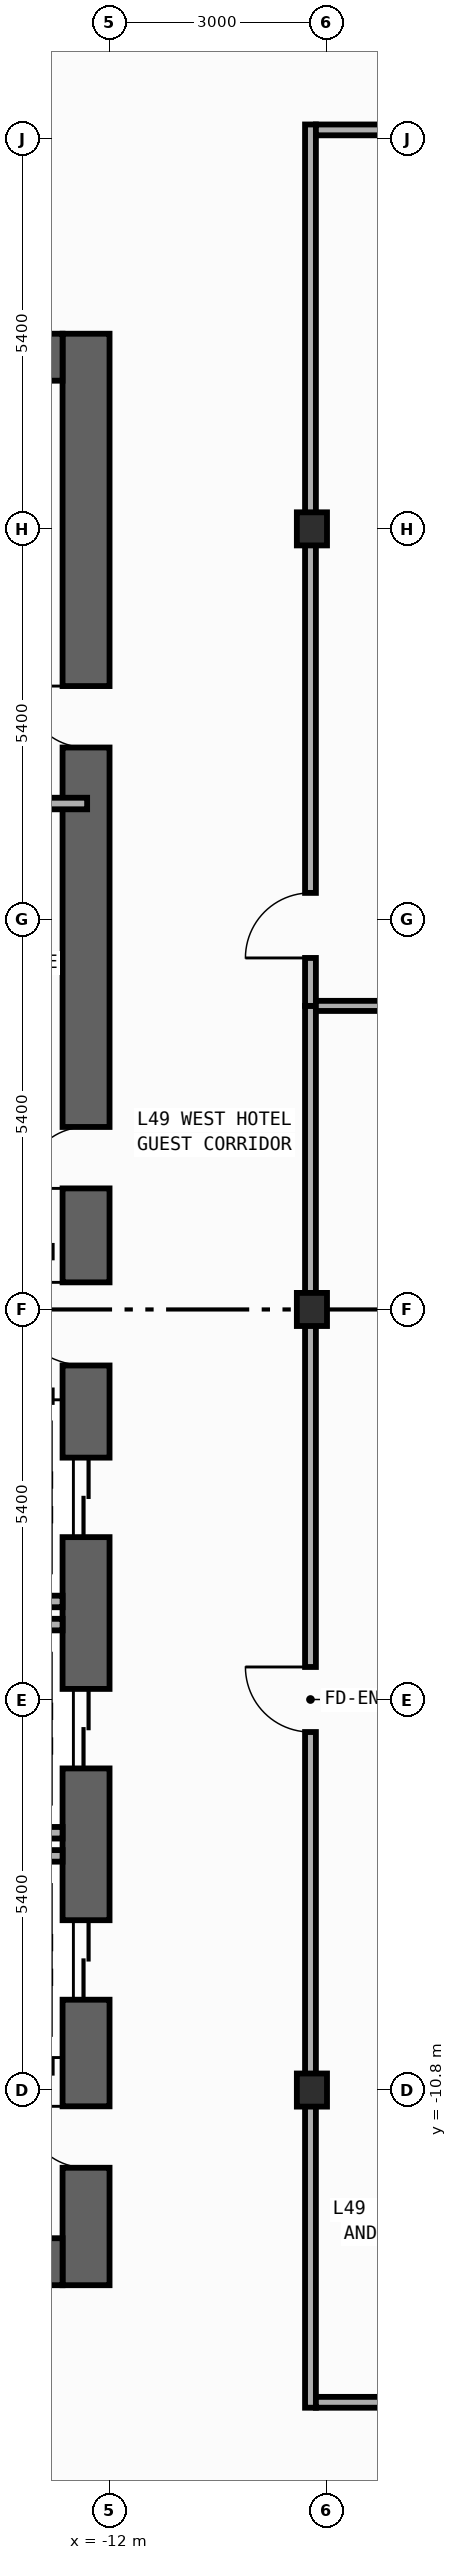
"""IFC4 building model, lengths in metres.
Left out: names, types, materials, properties, quantities, classifications, styles, units other than length and angle.
Written with IfcOpenShell. Run it as: python <this file> out.ifc"""

import sys

from ifc_helpers import new_model, si_unit, direction, frame, frame_2d, origin, origin_2d, place, context, subcontext, project, spatial, rectangle, i_section, extrude, element, fill, save


model = new_model("IFC4")
c1 = context("Model", 3, precision=1e-05, world=origin(), true_north=direction((0.0, 1.0)))
c2 = subcontext(c1, "Body", "Model", "MODEL_VIEW")
j1 = project(units=[si_unit("LENGTHUNIT", "METRE"), si_unit("PLANEANGLEUNIT", "RADIAN")], contexts=[c1])
p1 = place(None, origin())
s1 = spatial("IfcSite", under=j1, at=p1, CompositionType="ELEMENT")
p2 = place(p1, origin())
s2 = spatial("IfcBuilding", under=s1, at=p2, CompositionType="ELEMENT")
p3 = place(p2, frame((0.0, 0.0, 210.6)))
s3 = spatial("IfcBuildingStorey", under=s2, at=p3, CompositionType="ELEMENT", Elevation=210.6)
p4 = place(p3, frame((-12.325, -13.5, 0.0), z_axis=(0.0, 0.0, 1.0), x_axis=(0.0, 1.0, 0.0)))
e1 = element("IfcWall", 1, at=p4, inside=s3, PredefinedType="SHEAR", context=c2, shape_type="SweptSolid", body=[
    extrude(rectangle(XDim=27.0, YDim=0.65, at=frame_2d((13.5, 0.0))), origin(), (0.0, 0.0, 1.0), 3.45),
])
p5 = place(p4, frame((10.35, 0.0, 0.0)))
e2 = element("IfcOpeningElement", 2, at=p5, cuts=e1, PredefinedType="OPENING", context=c2, shape_type="SweptSolid", body=[
    extrude(rectangle(XDim=1.1, YDim=2.2, at=frame_2d((0.55, 1.1))), frame((0.0, 0.335, 0.0), z_axis=(0.0, -1.0, 0.0), x_axis=(1.0, 0.0, 0.0)), (0.0, 0.0, 1.0), 0.67),
])
p6 = place(p4, frame((7.15, 0.0, 0.0)))
e3 = element("IfcOpeningElement", 3, at=p6, cuts=e1, PredefinedType="OPENING", context=c2, shape_type="SweptSolid", body=[
    extrude(rectangle(XDim=1.1, YDim=2.2, at=frame_2d((0.55, 1.1))), frame((0.0, 0.335, 0.0), z_axis=(0.0, -1.0, 0.0), x_axis=(1.0, 0.0, 0.0)), (0.0, 0.0, 1.0), 0.67),
])
p7 = place(p4, frame((3.95, 0.0, 0.0)))
e4 = element("IfcOpeningElement", 4, at=p7, cuts=e1, PredefinedType="OPENING", context=c2, shape_type="SweptSolid", body=[
    extrude(rectangle(XDim=1.1, YDim=2.2, at=frame_2d((0.55, 1.1))), frame((0.0, 0.335, 0.0), z_axis=(0.0, -1.0, 0.0), x_axis=(1.0, 0.0, 0.0)), (0.0, 0.0, 1.0), 0.67),
])
p8 = place(p4, frame((15.175, 0.0, 0.0)))
e5 = element("IfcOpeningElement", 5, at=p8, cuts=e1, PredefinedType="OPENING", context=c2, shape_type="SweptSolid", body=[
    extrude(rectangle(XDim=0.85, YDim=2.1, at=frame_2d((0.425, 1.05))), frame((0.0, 0.335, 0.0), z_axis=(0.0, -1.0, 0.0), x_axis=(1.0, 0.0, 0.0)), (0.0, 0.0, 1.0), 0.67),
])
p9 = place(p4, frame((21.275, 0.0, 0.0)))
e6 = element("IfcOpeningElement", 6, at=p9, cuts=e1, PredefinedType="OPENING", context=c2, shape_type="SweptSolid", body=[
    extrude(rectangle(XDim=0.85, YDim=2.1, at=frame_2d((0.425, 1.05))), frame((0.0, 0.335, 0.0), z_axis=(0.0, -1.0, 0.0), x_axis=(1.0, 0.0, 0.0)), (0.0, 0.0, 1.0), 0.67),
])
p10 = place(p4, frame((12.725, 0.0, 0.0)))
e7 = element("IfcOpeningElement", 7, at=p10, cuts=e1, PredefinedType="OPENING", context=c2, shape_type="SweptSolid", body=[
    extrude(rectangle(XDim=1.15, YDim=2.2, at=frame_2d((0.575, 1.1))), frame((0.0, 0.335, 0.0), z_axis=(0.0, -1.0, 0.0), x_axis=(1.0, 0.0, 0.0)), (0.0, 0.0, 1.0), 0.67),
])
p11 = place(p4, frame((1.625, 0.0, 0.0)))
e8 = element("IfcOpeningElement", 8, at=p11, cuts=e1, PredefinedType="OPENING", context=c2, shape_type="SweptSolid", body=[
    extrude(rectangle(XDim=0.85, YDim=2.1, at=frame_2d((0.425, 1.05))), frame((0.0, 0.335, 0.0), z_axis=(0.0, -1.0, 0.0), x_axis=(1.0, 0.0, 0.0)), (0.0, 0.0, 1.0), 0.67),
])
for number, where, z_axis, x_axis in (
    (9, (-19.75, -13.175, 0.0), (0.0, 0.0, 1.0), (1.0, 0.0, 0.0)),
    (10, (-19.75, 13.175, 0.0), (0.0, 0.0, 1.0), (1.0, 0.0, 0.0)),
):
    element("IfcWall", number, at=place(p3, frame(where, z_axis=z_axis, x_axis=x_axis)), inside=s3, PredefinedType="SHEAR", context=c2, shape_type="SweptSolid", body=[
        extrude(rectangle(XDim=7.1, YDim=0.65, at=frame_2d((3.55, 0.0))), origin(), (0.0, 0.0, 1.0), 3.45),
    ])
for number, where, z_axis, x_axis in (
    (11, (-9.2, -10.8, 0.0), (0.0, 0.0, 1.0), (1.0, 0.0, 0.0)),
    (12, (-9.2, 0.0, 0.0), (0.0, 0.0, 1.0), (1.0, 0.0, 0.0)),
    (13, (-9.2, 10.8, 0.0), (0.0, 0.0, 1.0), (1.0, 0.0, 0.0)),
):
    element("IfcColumn", number, at=place(p3, frame(where, z_axis=z_axis, x_axis=x_axis)), inside=s3, PredefinedType="COLUMN", context=c2, shape_type="SweptSolid", body=[
        extrude(i_section(OverallWidth=0.417, OverallDepth=0.458, WebThickness=0.03, FlangeThickness=0.05, FilletRadius=0.022, at=origin_2d()), origin(), (0.0, 0.0, 1.0), 3.8),
    ])
for number, where, z_axis, x_axis in (
    (14, (-14.99, -4.04, 0.0), (0.0, 0.0, 1.0), (1.0, 0.0, 0.0)),
    (15, (-14.99, -7.24, 0.0), (0.0, 0.0, 1.0), (1.0, 0.0, 0.0)),
    (16, (-14.99, -4.36, 0.0), (0.0, 0.0, 1.0), (1.0, 0.0, 0.0)),
    (17, (-14.99, -7.56, 0.0), (0.0, 0.0, 1.0), (1.0, 0.0, 0.0)),
):
    element("IfcWall", number, at=place(p3, frame(where, z_axis=z_axis, x_axis=x_axis)), inside=s3, PredefinedType="STANDARD", context=c2, shape_type="SweptSolid", body=[
        extrude(rectangle(XDim=2.34, YDim=0.16, at=frame_2d((1.17, 0.0))), origin(), (0.0, 0.0, 1.0), 3.45),
    ])
p12 = place(p3, frame((-15.375, 7.0, 0.0), z_axis=(0.0, 0.0, 1.0), x_axis=(1.0, 0.0, 0.0)))
e18 = element("IfcWall", 18, at=p12, inside=s3, PredefinedType="PARTITIONING", context=c2, shape_type="SweptSolid", body=[
    extrude(rectangle(XDim=3.065, YDim=0.16, at=frame_2d((1.532, 0.0))), origin(), (0.0, 0.0, 1.0), 3.45),
])
p13 = place(p3, frame((-9.22, -15.195, 0.0), z_axis=(0.0, 0.0, 1.0), x_axis=(0.0, 1.0, 0.0)))
e19 = element("IfcWall", 19, at=p13, inside=s3, PredefinedType="PARTITIONING", context=c2, shape_type="SweptSolid", body=[
    extrude(rectangle(XDim=19.395, YDim=0.15, at=frame_2d((9.698, 0.0))), origin(), (0.0, 0.0, 1.0), 2.862),
])
p14 = place(p13, frame((9.348, 0.0, 0.0)))
e20 = element("IfcOpeningElement", 20, at=p14, cuts=e19, PredefinedType="OPENING", context=c2, shape_type="SweptSolid", body=[
    extrude(rectangle(XDim=0.9, YDim=2.15, at=frame_2d((0.45, 1.075))), frame((0.0, 0.085, 0.0), z_axis=(0.0, -1.0, 0.0), x_axis=(1.0, 0.0, 0.0)), (0.0, 0.0, 1.0), 0.17),
])
p15 = place(p3, frame((-9.22, 4.2, 0.0), z_axis=(0.0, 0.0, 1.0), x_axis=(0.0, 1.0, 0.0)))
e21 = element("IfcWall", 21, at=p15, inside=s3, PredefinedType="PARTITIONING", context=c2, shape_type="SweptSolid", body=[
    extrude(rectangle(XDim=12.195, YDim=0.15, at=frame_2d((6.098, 0.0))), origin(), (0.0, 0.0, 1.0), 2.862),
])
p16 = place(p15, frame((0.663, 0.0, 0.0)))
e22 = element("IfcOpeningElement", 22, at=p16, cuts=e21, PredefinedType="OPENING", context=c2, shape_type="SweptSolid", body=[
    extrude(rectangle(XDim=0.9, YDim=2.15, at=frame_2d((0.45, 1.075))), frame((0.0, 0.085, 0.0), z_axis=(0.0, -1.0, 0.0), x_axis=(1.0, 0.0, 0.0)), (0.0, 0.0, 1.0), 0.17),
])
p17 = place(p3, frame((-9.145, 16.32, 0.0), z_axis=(0.0, 0.0, 1.0), x_axis=(1.0, 0.0, 0.0)))
e23 = element("IfcWall", 23, at=p17, inside=s3, PredefinedType="PARTITIONING", context=c2, shape_type="SweptSolid", body=[
    extrude(rectangle(XDim=8.825, YDim=0.15, at=frame_2d((4.413, 0.0))), origin(), (0.0, 0.0, 1.0), 3.45),
])
p18 = place(p17, frame((1.661, 0.0, 0.0)))
e24 = element("IfcOpeningElement", 24, at=p18, cuts=e23, PredefinedType="OPENING", context=c2, shape_type="SweptSolid", body=[
    extrude(rectangle(XDim=0.9, YDim=2.15, at=frame_2d((0.45, 1.075))), frame((0.0, 0.085, 0.0), z_axis=(0.0, -1.0, 0.0), x_axis=(1.0, 0.0, 0.0)), (0.0, 0.0, 1.0), 0.17),
])
p19 = place(p3, frame((-9.145, -15.12, 0.0), z_axis=(0.0, 0.0, 1.0), x_axis=(1.0, 0.0, 0.0)))
e25 = element("IfcWall", 25, at=p19, inside=s3, PredefinedType="PARTITIONING", context=c2, shape_type="SweptSolid", body=[
    extrude(rectangle(XDim=3.025, YDim=0.15, at=frame_2d((1.512, 0.0))), origin(), (0.0, 0.0, 1.0), 3.45),
])
p20 = place(p19, frame((1.665, 0.0, 0.0)))
e26 = element("IfcOpeningElement", 26, at=p20, cuts=e25, PredefinedType="OPENING", context=c2, shape_type="SweptSolid", body=[
    extrude(rectangle(XDim=0.9, YDim=2.15, at=frame_2d((0.45, 1.075))), frame((0.0, 0.085, 0.0), z_axis=(0.0, -1.0, 0.0), x_axis=(1.0, 0.0, 0.0)), (0.0, 0.0, 1.0), 0.17),
])
p21 = place(p3, frame((-9.145, 4.2, 0.0), z_axis=(0.0, 0.0, 1.0), x_axis=(1.0, 0.0, 0.0)))
e27 = element("IfcWall", 27, at=p21, inside=s3, PredefinedType="PARTITIONING", context=c2, shape_type="SweptSolid", body=[
    extrude(rectangle(XDim=3.025, YDim=0.14, at=frame_2d((1.512, 0.0))), origin(), (0.0, 0.0, 1.0), 3.45),
])
p22 = place(p5, origin())
e28 = element("IfcDoor", 28, at=p22, inside=s3, OperationType="DOUBLE_DOOR_SLIDING", PredefinedType="DOOR", context=c2, shape_type="SweptSolid", body=[
    extrude(rectangle(XDim=1.1, YDim=2.2, at=frame_2d((0.55, 1.1))), frame((0.0, 0.025, 0.0), z_axis=(0.0, -1.0, 0.0), x_axis=(1.0, 0.0, 0.0)), (0.0, 0.0, 1.0), 0.05),
])
fill(e2, e28)
p23 = place(p6, origin())
e29 = element("IfcDoor", 29, at=p23, inside=s3, OperationType="DOUBLE_DOOR_SLIDING", PredefinedType="DOOR", context=c2, shape_type="SweptSolid", body=[
    extrude(rectangle(XDim=1.1, YDim=2.2, at=frame_2d((0.55, 1.1))), frame((0.0, 0.025, 0.0), z_axis=(0.0, -1.0, 0.0), x_axis=(1.0, 0.0, 0.0)), (0.0, 0.0, 1.0), 0.05),
])
fill(e3, e29)
p24 = place(p7, origin())
e30 = element("IfcDoor", 30, at=p24, inside=s3, OperationType="DOUBLE_DOOR_SLIDING", PredefinedType="DOOR", context=c2, shape_type="SweptSolid", body=[
    extrude(rectangle(XDim=1.1, YDim=2.2, at=frame_2d((0.55, 1.1))), frame((0.0, 0.025, 0.0), z_axis=(0.0, -1.0, 0.0), x_axis=(1.0, 0.0, 0.0)), (0.0, 0.0, 1.0), 0.05),
])
fill(e4, e30)
p25 = place(p8, origin())
e31 = element("IfcDoor", 31, at=p25, inside=s3, OperationType="SINGLE_SWING_LEFT", PredefinedType="DOOR", context=c2, shape_type="SweptSolid", body=[
    extrude(rectangle(XDim=0.85, YDim=2.1, at=frame_2d((0.425, 1.05))), frame((0.0, 0.025, 0.0), z_axis=(0.0, -1.0, 0.0), x_axis=(1.0, 0.0, 0.0)), (0.0, 0.0, 1.0), 0.05),
])
fill(e5, e31)
p26 = place(p9, origin())
e32 = element("IfcDoor", 32, at=p26, inside=s3, OperationType="SINGLE_SWING_RIGHT", PredefinedType="DOOR", context=c2, shape_type="SweptSolid", body=[
    extrude(rectangle(XDim=0.85, YDim=2.1, at=frame_2d((0.425, 1.05))), frame((0.0, 0.025, 0.0), z_axis=(0.0, -1.0, 0.0), x_axis=(1.0, 0.0, 0.0)), (0.0, 0.0, 1.0), 0.05),
])
fill(e6, e32)
p27 = place(p10, origin())
e33 = element("IfcDoor", 33, at=p27, inside=s3, OperationType="SINGLE_SWING_RIGHT", PredefinedType="DOOR", context=c2, shape_type="SweptSolid", body=[
    extrude(rectangle(XDim=1.15, YDim=2.2, at=frame_2d((0.575, 1.1))), frame((0.0, 0.025, 0.0), z_axis=(0.0, -1.0, 0.0), x_axis=(1.0, 0.0, 0.0)), (0.0, 0.0, 1.0), 0.05),
])
fill(e7, e33)
p28 = place(p11, origin())
e34 = element("IfcDoor", 34, at=p28, inside=s3, OperationType="SINGLE_SWING_RIGHT", PredefinedType="DOOR", context=c2, shape_type="SweptSolid", body=[
    extrude(rectangle(XDim=0.85, YDim=2.1, at=frame_2d((0.425, 1.05))), frame((0.0, 0.025, 0.0), z_axis=(0.0, -1.0, 0.0), x_axis=(1.0, 0.0, 0.0)), (0.0, 0.0, 1.0), 0.05),
])
fill(e8, e34)
p29 = place(p14, origin())
e35 = element("IfcDoor", 35, at=p29, inside=s3, OperationType="SINGLE_SWING_RIGHT", PredefinedType="DOOR", context=c2, shape_type="SweptSolid", body=[
    extrude(rectangle(XDim=0.9, YDim=2.15, at=frame_2d((0.45, 1.075))), frame((0.0, 0.025, 0.0), z_axis=(0.0, -1.0, 0.0), x_axis=(1.0, 0.0, 0.0)), (0.0, 0.0, 1.0), 0.05),
])
fill(e20, e35)
p30 = place(p16, origin())
e36 = element("IfcDoor", 36, at=p30, inside=s3, OperationType="SINGLE_SWING_LEFT", PredefinedType="DOOR", context=c2, shape_type="SweptSolid", body=[
    extrude(rectangle(XDim=0.9, YDim=2.15, at=frame_2d((0.45, 1.075))), frame((0.0, 0.025, 0.0), z_axis=(0.0, -1.0, 0.0), x_axis=(1.0, 0.0, 0.0)), (0.0, 0.0, 1.0), 0.05),
])
fill(e22, e36)
save(model, sys.argv[1])
